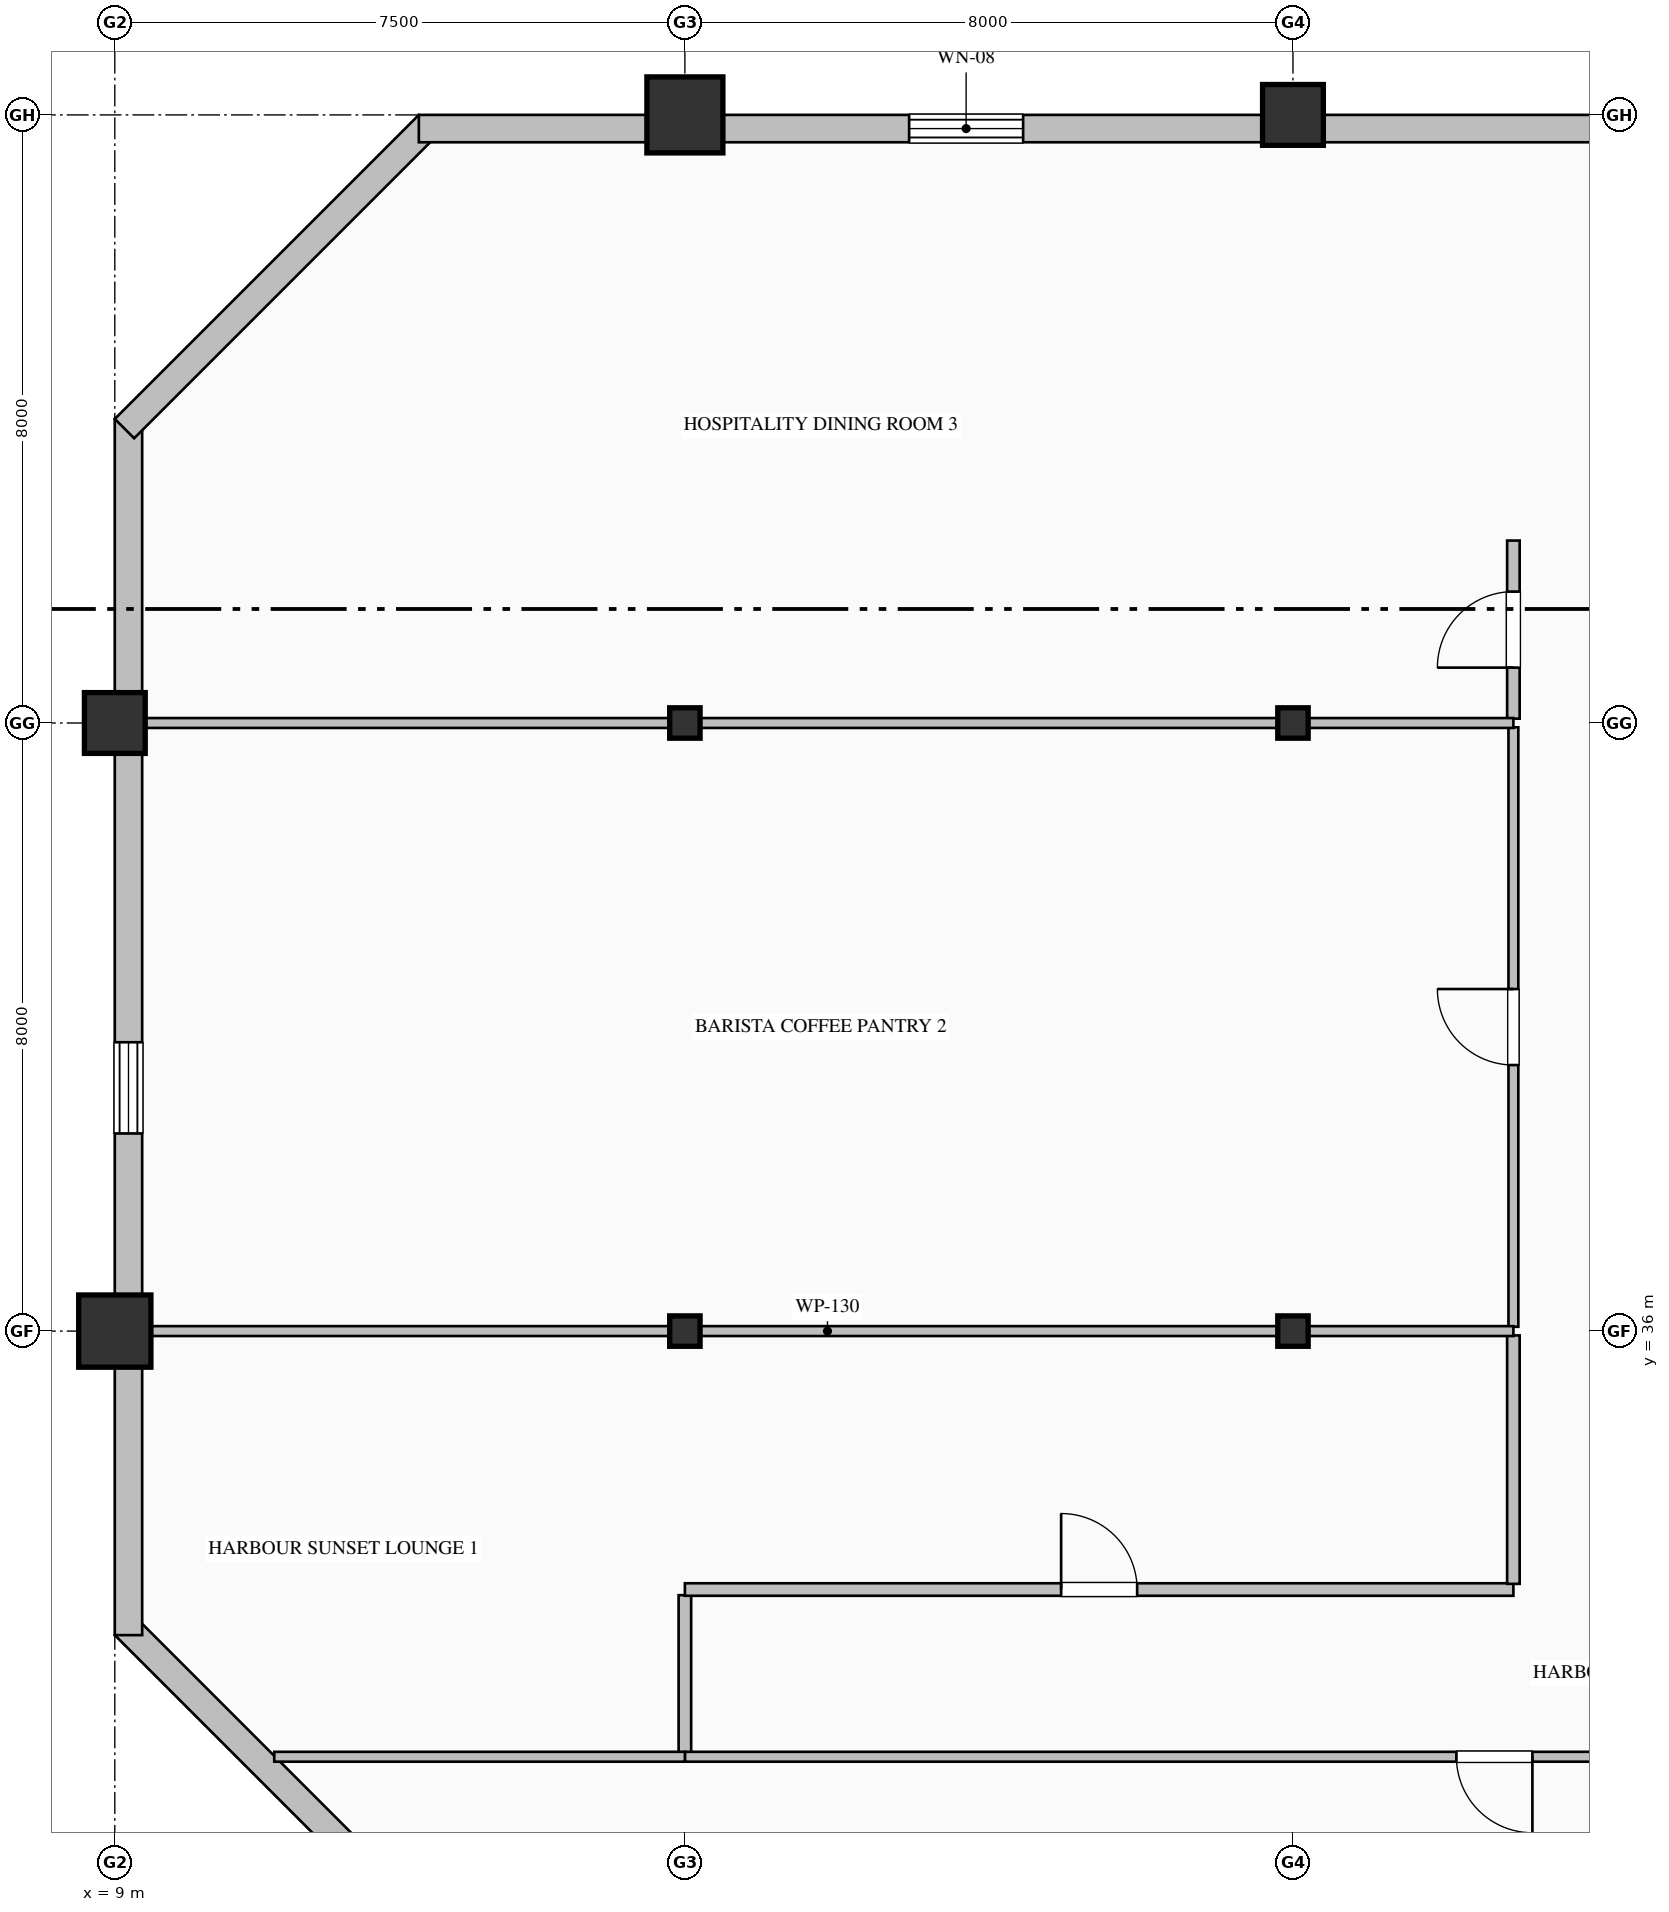
"""IFC4 building model, lengths in metres.
Left out: names, types, materials, properties, quantities, classifications, styles, units other than length and angle.
Written with IfcOpenShell. Run it as: python <this file> out.ifc"""

import sys

from ifc_helpers import new_model, si_unit, direction, frame, frame_2d, origin, origin_2d, place, context, subcontext, project, spatial, rectangle, hollow_rectangle, hollow_circle, i_section, extrude, element, fill, save


model = new_model("IFC4")
c1 = context("Model", 3, precision=1e-05, world=origin(), true_north=direction((0.0, 1.0)))
c2 = subcontext(c1, "Body", "Model", "MODEL_VIEW")
j1 = project(units=[si_unit("LENGTHUNIT", "METRE"), si_unit("PLANEANGLEUNIT", "RADIAN")], contexts=[c1])
p1 = place(None, origin())
s1 = spatial("IfcSite", under=j1, at=p1, CompositionType="ELEMENT")
p2 = place(p1, origin())
s2 = spatial("IfcBuilding", under=s1, at=p2, CompositionType="ELEMENT")
p3 = place(p2, frame((0.0, 0.0, 245.8)))
s3 = spatial("IfcBuildingStorey", under=s2, at=p3, CompositionType="ELEMENT", Elevation=245.8)
p4 = place(p3, frame((9.0, 36.0, 0.0), z_axis=(0.0, 0.0, 1.0), x_axis=(1.0, 0.0, 0.0)))
e1 = element("IfcColumn", 1, at=p4, inside=s3, PredefinedType="COLUMN", context=c2, shape_type="SweptSolid", body=[
    extrude(hollow_rectangle(XDim=0.95, YDim=0.95, WallThickness=0.036, at=origin_2d()), origin(), (0.0, 0.0, 1.0), 4.0),
])
p5 = place(p3, frame((9.0, 44.0, 0.0), z_axis=(0.0, 0.0, 1.0), x_axis=(1.0, 0.0, 0.0)))
e2 = element("IfcColumn", 2, at=p5, inside=s3, PredefinedType="COLUMN", context=c2, shape_type="SweptSolid", body=[
    extrude(hollow_rectangle(XDim=0.8, YDim=0.8, WallThickness=0.032, at=origin_2d()), origin(), (0.0, 0.0, 1.0), 4.0),
])
for number, where, z_axis, x_axis in (
    (3, (16.5, 36.0, 0.0), (0.0, 0.0, 1.0), (1.0, 0.0, 0.0)),
    (4, (16.5, 44.0, 0.0), (0.0, 0.0, 1.0), (1.0, 0.0, 0.0)),
):
    element("IfcColumn", number, at=place(p3, frame(where, z_axis=z_axis, x_axis=x_axis)), inside=s3, PredefinedType="COLUMN", context=c2, shape_type="SweptSolid", body=[
        extrude(i_section(OverallWidth=0.4, OverallDepth=0.4, WebThickness=0.013, FlangeThickness=0.021, FilletRadius=0.022, at=origin_2d()), origin(), (0.0, 0.0, 1.0), 4.0),
    ])
p6 = place(p3, frame((16.5, 52.0, 0.0), z_axis=(0.0, 0.0, 1.0), x_axis=(1.0, 0.0, 0.0)))
e5 = element("IfcColumn", 5, at=p6, inside=s3, PredefinedType="COLUMN", context=c2, shape_type="SweptSolid", body=[
    extrude(hollow_circle(Radius=0.5, WallThickness=0.036, at=origin_2d()), origin(), (0.0, 0.0, 1.0), 4.0),
])
for number, where, z_axis, x_axis in (
    (6, (24.5, 36.0, 0.0), (0.0, 0.0, 1.0), (1.0, 0.0, 0.0)),
    (7, (24.5, 44.0, 0.0), (0.0, 0.0, 1.0), (1.0, 0.0, 0.0)),
):
    element("IfcColumn", number, at=place(p3, frame(where, z_axis=z_axis, x_axis=x_axis)), inside=s3, PredefinedType="COLUMN", context=c2, shape_type="SweptSolid", body=[
        extrude(i_section(OverallWidth=0.4, OverallDepth=0.4, WebThickness=0.013, FlangeThickness=0.021, FilletRadius=0.022, at=origin_2d()), origin(), (0.0, 0.0, 1.0), 4.0),
    ])
p7 = place(p3, frame((24.5, 52.0, 0.0), z_axis=(0.0, 0.0, 1.0), x_axis=(1.0, 0.0, 0.0)))
e8 = element("IfcColumn", 8, at=p7, inside=s3, PredefinedType="COLUMN", context=c2, shape_type="SweptSolid", body=[
    extrude(hollow_rectangle(XDim=0.8, YDim=0.8, WallThickness=0.032, at=origin_2d()), origin(), (0.0, 0.0, 1.0), 4.0),
])
p8 = place(p3, frame((13.127, 28.127, 0.0), z_axis=(0.0, 0.0, 1.0), x_axis=(-0.707106781187, 0.707106781187, 0.0)))
e9 = element("IfcWall", 9, at=p8, inside=s3, PredefinedType="SOLIDWALL", context=c2, shape_type="SweptSolid", body=[
    extrude(rectangle(XDim=5.657, YDim=0.36, at=frame_2d((2.828, 0.0))), origin(), (0.0, 0.0, 1.0), 3.775),
])
p9 = place(p3, frame((9.18, 32.0, 0.0), z_axis=(0.0, 0.0, 1.0), x_axis=(0.0, 1.0, 0.0)))
e10 = element("IfcWall", 10, at=p9, inside=s3, PredefinedType="SOLIDWALL", context=c2, shape_type="SweptSolid", body=[
    extrude(rectangle(XDim=16.0, YDim=0.36, at=frame_2d((8.0, 0.0))), origin(), (0.0, 0.0, 1.0), 3.325),
])
p10 = place(p9, frame((6.6, 0.0, 0.9)))
e11 = element("IfcOpeningElement", 11, at=p10, cuts=e10, PredefinedType="OPENING", context=c2, shape_type="SweptSolid", body=[
    extrude(rectangle(XDim=1.2, YDim=1.85, at=frame_2d((0.6, 0.925))), frame((0.0, 0.19, 0.0), z_axis=(0.0, -1.0, 0.0), x_axis=(1.0, 0.0, 0.0)), (0.0, 0.0, 1.0), 0.38),
])
p11 = place(p3, frame((9.127, 47.873, 0.0), z_axis=(0.0, 0.0, 1.0), x_axis=(0.707106781187, 0.707106781187, 0.0)))
e12 = element("IfcWall", 12, at=p11, inside=s3, PredefinedType="SOLIDWALL", context=c2, shape_type="SweptSolid", body=[
    extrude(rectangle(XDim=5.657, YDim=0.36, at=frame_2d((2.828, 0.0))), origin(), (0.0, 0.0, 1.0), 3.775),
])
p12 = place(p3, frame((13.0, 51.82, 0.0), z_axis=(0.0, 0.0, 1.0), x_axis=(1.0, 0.0, 0.0)))
e13 = element("IfcWall", 13, at=p12, inside=s3, PredefinedType="SOLIDWALL", context=c2, shape_type="SweptSolid", body=[
    extrude(rectangle(XDim=27.52, YDim=0.36, at=frame_2d((13.76, 0.0))), origin(), (0.0, 0.0, 1.0), 3.325),
])
p13 = place(p12, frame((6.45, 0.0, 0.7)))
e14 = element("IfcOpeningElement", 14, at=p13, cuts=e13, PredefinedType="OPENING", context=c2, shape_type="SweptSolid", body=[
    extrude(rectangle(XDim=1.5, YDim=2.4, at=frame_2d((0.75, 1.2))), frame((0.0, 0.19, 0.0), z_axis=(0.0, -1.0, 0.0), x_axis=(1.0, 0.0, 0.0)), (0.0, 0.0, 1.0), 0.38),
])
p14 = place(p12, frame((17.25, 0.0, 0.7)))
e15 = element("IfcOpeningElement", 15, at=p14, cuts=e13, PredefinedType="OPENING", context=c2, shape_type="SweptSolid", body=[
    extrude(rectangle(XDim=1.5, YDim=2.4, at=frame_2d((0.75, 1.2))), frame((0.0, 0.19, 0.0), z_axis=(0.0, -1.0, 0.0), x_axis=(1.0, 0.0, 0.0)), (0.0, 0.0, 1.0), 0.38),
])
p15 = place(p3, frame((16.5, 30.457, 0.0), z_axis=(0.0, 0.0, 1.0), x_axis=(0.0, 1.0, 0.0)))
e16 = element("IfcWall", 16, at=p15, inside=s3, PredefinedType="PARTITIONING", context=c2, shape_type="SweptSolid", body=[
    extrude(rectangle(XDim=2.068, YDim=0.165, at=frame_2d((1.034, 0.0))), origin(), (0.0, 0.0, 1.0), 3.179),
])
p16 = place(p3, frame((16.5, 32.6, 0.0), z_axis=(0.0, 0.0, 1.0), x_axis=(1.0, 0.0, 0.0)))
e17 = element("IfcWall", 17, at=p16, inside=s3, PredefinedType="PARTITIONING", context=c2, shape_type="SweptSolid", body=[
    extrude(rectangle(XDim=10.9, YDim=0.165, at=frame_2d((5.45, 0.0))), origin(), (0.0, 0.0, 1.0), 3.775),
])
p17 = place(p16, frame((4.95, 0.0, 0.0)))
e18 = element("IfcOpeningElement", 18, at=p17, cuts=e17, PredefinedType="OPENING", context=c2, shape_type="SweptSolid", body=[
    extrude(rectangle(XDim=1.0, YDim=2.15, at=frame_2d((0.5, 1.075))), frame((0.0, 0.093, 0.0), z_axis=(0.0, -1.0, 0.0), x_axis=(1.0, 0.0, 0.0)), (0.0, 0.0, 1.0), 0.185),
])
p18 = place(p3, frame((37.8, 30.4, 0.0), z_axis=(0.0, 0.0, 1.0), x_axis=(-1.0, 0.0, 0.0)))
e19 = element("IfcWall", 19, at=p18, inside=s3, PredefinedType="PARTITIONING", context=c2, shape_type="SweptSolid", body=[
    extrude(rectangle(XDim=21.3, YDim=0.13, at=frame_2d((10.65, 0.0))), origin(), (0.0, 0.0, 1.0), 3.775),
])
p19 = place(p18, frame((10.15, 0.0, 0.0)))
e20 = element("IfcOpeningElement", 20, at=p19, cuts=e19, PredefinedType="OPENING", context=c2, shape_type="SweptSolid", body=[
    extrude(rectangle(XDim=1.0, YDim=2.15, at=frame_2d((0.5, 1.075))), frame((0.0, 0.075, 0.0), z_axis=(0.0, -1.0, 0.0), x_axis=(1.0, 0.0, 0.0)), (0.0, 0.0, 1.0), 0.15),
])
p20 = place(p3, frame((27.4, 32.675, 0.0), z_axis=(0.0, 0.0, 1.0), x_axis=(0.0, 1.0, 0.0)))
e21 = element("IfcWall", 21, at=p20, inside=s3, PredefinedType="PARTITIONING", context=c2, shape_type="SweptSolid", body=[
    extrude(rectangle(XDim=3.269, YDim=0.165, at=frame_2d((1.634, 0.0))), origin(), (0.0, 0.0, 1.0), 3.775),
])
p21 = place(p3, frame((27.4, 36.057, 0.0), z_axis=(0.0, 0.0, 1.0), x_axis=(0.0, 1.0, 0.0)))
e22 = element("IfcWall", 22, at=p21, inside=s3, PredefinedType="PARTITIONING", context=c2, shape_type="SweptSolid", body=[
    extrude(rectangle(XDim=7.886, YDim=0.13, at=frame_2d((3.943, 0.0))), origin(), (0.0, 0.0, 1.0), 3.775),
])
p22 = place(p21, frame((3.443, 0.0, 0.0)))
e23 = element("IfcOpeningElement", 23, at=p22, cuts=e22, PredefinedType="OPENING", context=c2, shape_type="SweptSolid", body=[
    extrude(rectangle(XDim=1.0, YDim=2.15, at=frame_2d((0.5, 1.075))), frame((0.0, 0.075, 0.0), z_axis=(0.0, -1.0, 0.0), x_axis=(1.0, 0.0, 0.0)), (0.0, 0.0, 1.0), 0.15),
])
p23 = place(p3, frame((27.4, 44.057, 0.0), z_axis=(0.0, 0.0, 1.0), x_axis=(0.0, 1.0, 0.0)))
e24 = element("IfcWall", 24, at=p23, inside=s3, PredefinedType="PARTITIONING", context=c2, shape_type="SweptSolid", body=[
    extrude(rectangle(XDim=2.343, YDim=0.165, at=frame_2d((1.171, 0.0))), origin(), (0.0, 0.0, 1.0), 3.775),
])
p24 = place(p23, frame((0.671, 0.0, 0.0)))
e25 = element("IfcOpeningElement", 25, at=p24, cuts=e24, PredefinedType="OPENING", context=c2, shape_type="SweptSolid", body=[
    extrude(rectangle(XDim=1.0, YDim=2.15, at=frame_2d((0.5, 1.075))), frame((0.0, 0.093, 0.0), z_axis=(0.0, -1.0, 0.0), x_axis=(1.0, 0.0, 0.0)), (0.0, 0.0, 1.0), 0.185),
])
p25 = place(p3, frame((9.352, 36.0, 0.0), z_axis=(0.0, 0.0, 1.0), x_axis=(1.0, 0.0, 0.0)))
e26 = element("IfcWall", 26, at=p25, inside=s3, PredefinedType="PARTITIONING", context=c2, shape_type="SweptSolid", body=[
    extrude(rectangle(XDim=18.048, YDim=0.13, at=frame_2d((9.024, 0.0))), origin(), (0.0, 0.0, 1.0), 3.179),
])
p26 = place(p3, frame((16.5, 30.4, 0.0), z_axis=(0.0, 0.0, 1.0), x_axis=(-1.0, 0.0, 0.0)))
e27 = element("IfcWall", 27, at=p26, inside=s3, PredefinedType="PARTITIONING", context=c2, shape_type="SweptSolid", body=[
    extrude(rectangle(XDim=5.402, YDim=0.13, at=frame_2d((2.701, 0.0))), origin(), (0.0, 0.0, 1.0), 3.775),
])
p27 = place(p3, frame((9.352, 44.0, 0.0), z_axis=(0.0, 0.0, 1.0), x_axis=(1.0, 0.0, 0.0)))
e28 = element("IfcWall", 28, at=p27, inside=s3, PredefinedType="PARTITIONING", context=c2, shape_type="SweptSolid", body=[
    extrude(rectangle(XDim=18.048, YDim=0.13, at=frame_2d((9.024, 0.0))), origin(), (0.0, 0.0, 1.0), 3.179),
])
p28 = place(p10, origin())
e29 = element("IfcWindow", 29, at=p28, inside=s3, PartitioningType="DOUBLE_PANEL_VERTICAL", PredefinedType="WINDOW", context=c2, shape_type="SweptSolid", body=[
    extrude(rectangle(XDim=1.2, YDim=1.85, at=frame_2d((0.6, 0.925))), frame((0.0, 0.15, 0.0), z_axis=(0.0, -1.0, 0.0), x_axis=(1.0, 0.0, 0.0)), (0.0, 0.0, 1.0), 0.06),
])
fill(e11, e29)
p29 = place(p13, origin())
e30 = element("IfcWindow", 30, at=p29, inside=s3, PartitioningType="DOUBLE_PANEL_HORIZONTAL", PredefinedType="WINDOW", context=c2, shape_type="SweptSolid", body=[
    extrude(rectangle(XDim=1.5, YDim=2.4, at=frame_2d((0.75, 1.2))), frame((0.0, 0.15, 0.0), z_axis=(0.0, -1.0, 0.0), x_axis=(1.0, 0.0, 0.0)), (0.0, 0.0, 1.0), 0.06),
])
fill(e14, e30)
p30 = place(p17, origin())
e31 = element("IfcDoor", 31, at=p30, inside=s3, OperationType="SINGLE_SWING_LEFT", PredefinedType="DOOR", context=c2, shape_type="SweptSolid", body=[
    extrude(rectangle(XDim=1.0, YDim=2.15, at=frame_2d((0.5, 1.075))), frame((0.0, 0.025, 0.0), z_axis=(0.0, -1.0, 0.0), x_axis=(1.0, 0.0, 0.0)), (0.0, 0.0, 1.0), 0.05),
])
fill(e18, e31)
p31 = place(p22, origin())
e32 = element("IfcDoor", 32, at=p31, inside=s3, OperationType="SINGLE_SWING_RIGHT", PredefinedType="DOOR", context=c2, shape_type="SweptSolid", body=[
    extrude(rectangle(XDim=1.0, YDim=2.15, at=frame_2d((0.5, 1.075))), frame((0.0, 0.025, 0.0), z_axis=(0.0, -1.0, 0.0), x_axis=(1.0, 0.0, 0.0)), (0.0, 0.0, 1.0), 0.05),
])
fill(e23, e32)
p32 = place(p24, origin())
e33 = element("IfcDoor", 33, at=p32, inside=s3, OperationType="SINGLE_SWING_LEFT", PredefinedType="DOOR", context=c2, shape_type="SweptSolid", body=[
    extrude(rectangle(XDim=1.0, YDim=2.15, at=frame_2d((0.5, 1.075))), frame((0.0, 0.025, 0.0), z_axis=(0.0, -1.0, 0.0), x_axis=(1.0, 0.0, 0.0)), (0.0, 0.0, 1.0), 0.05),
])
fill(e25, e33)
p33 = place(p19, origin())
e34 = element("IfcDoor", 34, at=p33, inside=s3, OperationType="SINGLE_SWING_LEFT", PredefinedType="DOOR", context=c2, shape_type="SweptSolid", body=[
    extrude(rectangle(XDim=1.0, YDim=2.15, at=frame_2d((0.5, 1.075))), frame((0.0, 0.025, 0.0), z_axis=(0.0, -1.0, 0.0), x_axis=(1.0, 0.0, 0.0)), (0.0, 0.0, 1.0), 0.05),
])
fill(e20, e34)
save(model, sys.argv[1])
